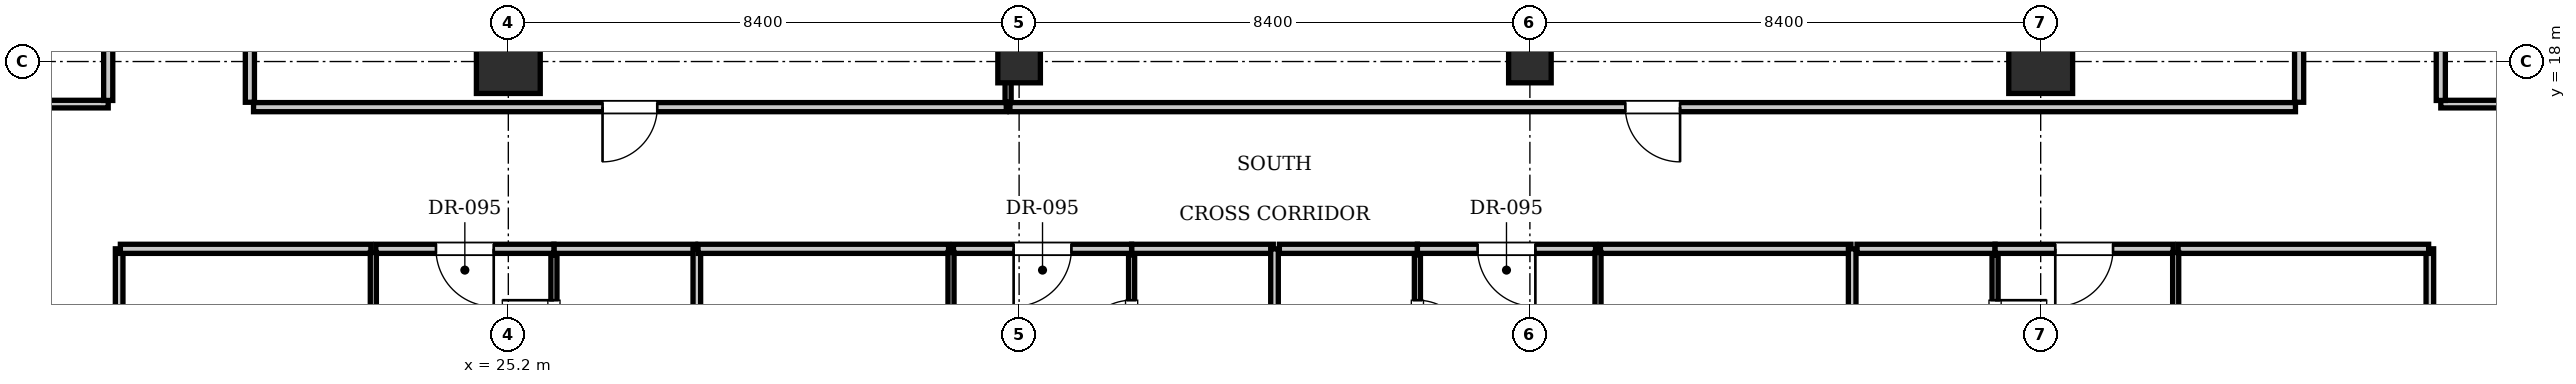
"""IFC4 building model, lengths in metres.
Left out: names, types, materials, properties, quantities, classifications, styles, units other than length and angle.
Written with IfcOpenShell. Run it as: python <this file> out.ifc"""

import sys

from ifc_helpers import new_model, si_unit, direction, frame, frame_2d, origin, origin_2d, place, context, subcontext, project, spatial, rectangle, i_section, extrude, element, fill, save


model = new_model("IFC4")
c1 = context("Model", 3, precision=1e-05, world=origin(), true_north=direction((0.0, 1.0)))
c2 = subcontext(c1, "Body", "Model", "MODEL_VIEW")
j1 = project(units=[si_unit("LENGTHUNIT", "METRE"), si_unit("PLANEANGLEUNIT", "RADIAN")], contexts=[c1])
p1 = place(None, origin())
s1 = spatial("IfcSite", under=j1, at=p1, CompositionType="ELEMENT")
p2 = place(p1, origin())
s2 = spatial("IfcBuilding", under=s1, at=p2, CompositionType="ELEMENT")
p3 = place(p2, frame((0.0, 0.0, 100.1)))
s3 = spatial("IfcBuildingStorey", under=s2, at=p3, CompositionType="ELEMENT", Elevation=100.1)
for number, where, z_axis, x_axis in (
    (1, (25.2, 18.0, 0.0), (0.0, 0.0, 1.0), (1.0, 0.0, 0.0)),
    (2, (50.4, 18.0, 0.0), (0.0, 0.0, 1.0), (1.0, 0.0, 0.0)),
):
    element("IfcColumn", number, at=place(p3, frame(where, z_axis=z_axis, x_axis=x_axis)), inside=s3, PredefinedType="COLUMN", context=c2, shape_type="SweptSolid", body=[
        extrude(rectangle(XDim=1.05, YDim=1.05, at=origin_2d()), origin(), (0.0, 0.0, 1.0), 3.85),
    ])
for number, where, z_axis, x_axis in (
    (3, (33.6, 18.0, 0.0), (0.0, 0.0, 1.0), (1.0, 0.0, 0.0)),
    (4, (42.0, 18.0, 0.0), (0.0, 0.0, 1.0), (1.0, 0.0, 0.0)),
):
    element("IfcColumn", number, at=place(p3, frame(where, z_axis=z_axis, x_axis=x_axis)), inside=s3, PredefinedType="COLUMN", context=c2, shape_type="SweptSolid", body=[
        extrude(i_section(OverallWidth=0.7, OverallDepth=0.7, WebThickness=0.028, FlangeThickness=0.044, at=origin_2d()), origin(), (0.0, 0.0, 1.0), 3.85),
    ])
for number, where, z_axis, x_axis in (
    (5, (20.95, 17.33, 0.0), (0.0, 0.0, 1.0), (0.0, 1.0, 0.0)),
    (6, (54.65, 17.33, 0.0), (0.0, 0.0, 1.0), (0.0, 1.0, 0.0)),
):
    element("IfcWall", number, at=place(p3, frame(where, z_axis=z_axis, x_axis=x_axis)), inside=s3, PredefinedType="PARTITIONING", context=c2, shape_type="SweptSolid", body=[
        extrude(rectangle(XDim=7.33, YDim=0.15, at=frame_2d((3.665, 0.0))), origin(), (0.0, 0.0, 1.0), 3.255),
    ])
p4 = place(p3, frame((21.01, 17.25, 0.0), z_axis=(0.0, 0.0, 1.0), x_axis=(1.0, 0.0, 0.0)))
e7 = element("IfcWall", 7, at=p4, inside=s3, PredefinedType="PARTITIONING", context=c2, shape_type="SweptSolid", body=[
    extrude(rectangle(XDim=12.379, YDim=0.15, at=frame_2d((6.189, 0.0))), origin(), (0.0, 0.0, 1.0), 3.61),
])
p5 = place(p4, frame((5.74, 0.0, 0.0)))
e8 = element("IfcOpeningElement", 8, at=p5, cuts=e7, PredefinedType="OPENING", context=c2, shape_type="SweptSolid", body=[
    extrude(rectangle(XDim=0.9, YDim=2.1, at=frame_2d((0.45, 1.05))), frame((0.0, 0.085, 0.0), z_axis=(0.0, -1.0, 0.0), x_axis=(1.0, 0.0, 0.0)), (0.0, 0.0, 1.0), 0.17),
])
p6 = place(p3, frame((33.419, 17.33, 0.0), z_axis=(0.0, 0.0, 1.0), x_axis=(0.0, 1.0, 0.0)))
e9 = element("IfcWall", 9, at=p6, inside=s3, PredefinedType="PARTITIONING", context=c2, shape_type="SweptSolid", body=[
    extrude(rectangle(XDim=7.33, YDim=0.1, at=frame_2d((3.665, 0.0))), origin(), (0.0, 0.0, 1.0), 2.999),
])
p7 = place(p3, frame((33.449, 17.25, 0.0), z_axis=(0.0, 0.0, 1.0), x_axis=(1.0, 0.0, 0.0)))
e10 = element("IfcWall", 10, at=p7, inside=s3, PredefinedType="PARTITIONING", context=c2, shape_type="SweptSolid", body=[
    extrude(rectangle(XDim=21.141, YDim=0.15, at=frame_2d((10.571, 0.0))), origin(), (0.0, 0.0, 1.0), 3.61),
])
p8 = place(p7, frame((10.121, 0.0, 0.0)))
e11 = element("IfcOpeningElement", 11, at=p8, cuts=e10, PredefinedType="OPENING", context=c2, shape_type="SweptSolid", body=[
    extrude(rectangle(XDim=0.9, YDim=2.1, at=frame_2d((0.45, 1.05))), frame((0.0, 0.085, 0.0), z_axis=(0.0, -1.0, 0.0), x_axis=(1.0, 0.0, 0.0)), (0.0, 0.0, 1.0), 0.17),
])
for number, where, z_axis, x_axis in (
    (12, (18.8, 0.1, 0.0), (0.0, 0.0, 1.0), (0.0, 1.0, 0.0)),
    (13, (56.8, 0.1, 0.0), (0.0, 0.0, 1.0), (0.0, 1.0, 0.0)),
):
    element("IfcWall", number, at=place(p3, frame(where, z_axis=z_axis, x_axis=x_axis)), inside=s3, PredefinedType="PARTITIONING", context=c2, shape_type="SweptSolid", body=[
        extrude(rectangle(XDim=14.82, YDim=0.125, at=frame_2d((7.41, 0.0))), origin(), (0.0, 0.0, 1.0), 3.61),
    ])
p9 = place(p3, frame((25.95, 14.92, 0.0), z_axis=(0.0, 0.0, 1.0), x_axis=(1.0, 0.0, 0.0)))
e14 = element("IfcWall", 14, at=p9, inside=s3, PredefinedType="PARTITIONING", context=c2, shape_type="SweptSolid", body=[
    extrude(rectangle(XDim=2.33, YDim=0.15, at=frame_2d((1.165, 0.0))), origin(), (0.0, 0.0, 1.0), 3.61),
])
p10 = place(p3, frame((25.95, 12.48, 0.0), z_axis=(0.0, 0.0, 1.0), x_axis=(0.0, 1.0, 0.0)))
e15 = element("IfcWall", 15, at=p10, inside=s3, PredefinedType="PARTITIONING", context=c2, shape_type="SweptSolid", body=[
    extrude(rectangle(XDim=2.34, YDim=0.1, at=frame_2d((1.17, 0.0))), origin(), (0.0, 0.0, 1.0), 3.61),
])
p11 = place(p10, frame((0.745, 0.0, 0.0)))
e16 = element("IfcOpeningElement", 16, at=p11, cuts=e15, PredefinedType="OPENING", context=c2, shape_type="SweptSolid", body=[
    extrude(rectangle(XDim=0.85, YDim=2.1, at=frame_2d((0.425, 1.05))), frame((0.0, 0.06, 0.0), z_axis=(0.0, -1.0, 0.0), x_axis=(1.0, 0.0, 0.0)), (0.0, 0.0, 1.0), 0.12),
])
p12 = place(p3, frame((18.82, 14.92, 0.0), z_axis=(0.0, 0.0, 1.0), x_axis=(1.0, 0.0, 0.0)))
e17 = element("IfcWall", 17, at=p12, inside=s3, PredefinedType="PARTITIONING", context=c2, shape_type="SweptSolid", body=[
    extrude(rectangle(XDim=4.12, YDim=0.15, at=frame_2d((2.06, 0.0))), origin(), (0.0, 0.0, 1.0), 3.61),
])
p13 = place(p3, frame((23.02, 14.92, 0.0), z_axis=(0.0, 0.0, 1.0), x_axis=(1.0, 0.0, 0.0)))
e18 = element("IfcWall", 18, at=p13, inside=s3, PredefinedType="PARTITIONING", context=c2, shape_type="SweptSolid", body=[
    extrude(rectangle(XDim=2.93, YDim=0.15, at=frame_2d((1.465, 0.0))), origin(), (0.0, 0.0, 1.0), 3.61),
])
p14 = place(p13, frame((0.99, 0.0, 0.0)))
e19 = element("IfcOpeningElement", 19, at=p14, cuts=e18, PredefinedType="OPENING", context=c2, shape_type="SweptSolid", body=[
    extrude(rectangle(XDim=0.95, YDim=2.15, at=frame_2d((0.475, 1.075))), frame((0.0, 0.085, 0.0), z_axis=(0.0, -1.0, 0.0), x_axis=(1.0, 0.0, 0.0)), (0.0, 0.0, 1.0), 0.17),
])
p15 = place(p3, frame((22.98, 0.03, 0.0), z_axis=(0.0, 0.0, 1.0), x_axis=(0.0, 1.0, 0.0)))
e20 = element("IfcWall", 20, at=p15, inside=s3, PredefinedType="PARTITIONING", context=c2, shape_type="SweptSolid", body=[
    extrude(rectangle(XDim=14.83, YDim=0.1, at=frame_2d((7.415, 0.0))), origin(), (0.0, 0.0, 1.0), 3.61),
])
p16 = place(p15, frame((1.6, 0.0, 0.0)))
e21 = element("IfcOpeningElement", 21, at=p16, cuts=e20, PredefinedType="OPENING", context=c2, shape_type="SweptSolid", body=[
    extrude(rectangle(XDim=0.9, YDim=2.1, at=frame_2d((0.45, 1.05))), frame((0.0, 0.06, 0.0), z_axis=(0.0, -1.0, 0.0), x_axis=(1.0, 0.0, 0.0)), (0.0, 0.0, 1.0), 0.12),
])
p17 = place(p3, frame((28.3, 0.1, 0.0), z_axis=(0.0, 0.0, 1.0), x_axis=(0.0, 1.0, 0.0)))
e22 = element("IfcWall", 22, at=p17, inside=s3, PredefinedType="PARTITIONING", context=c2, shape_type="SweptSolid", body=[
    extrude(rectangle(XDim=14.82, YDim=0.125, at=frame_2d((7.41, 0.0))), origin(), (0.0, 0.0, 1.0), 3.61),
])
p18 = place(p3, frame((35.45, 14.92, 0.0), z_axis=(0.0, 0.0, 1.0), x_axis=(1.0, 0.0, 0.0)))
e23 = element("IfcWall", 23, at=p18, inside=s3, PredefinedType="PARTITIONING", context=c2, shape_type="SweptSolid", body=[
    extrude(rectangle(XDim=2.33, YDim=0.15, at=frame_2d((1.165, 0.0))), origin(), (0.0, 0.0, 1.0), 3.61),
])
p19 = place(p3, frame((35.45, 12.48, 0.0), z_axis=(0.0, 0.0, 1.0), x_axis=(0.0, 1.0, 0.0)))
e24 = element("IfcWall", 24, at=p19, inside=s3, PredefinedType="PARTITIONING", context=c2, shape_type="SweptSolid", body=[
    extrude(rectangle(XDim=2.34, YDim=0.1, at=frame_2d((1.17, 0.0))), origin(), (0.0, 0.0, 1.0), 3.61),
])
p20 = place(p19, frame((0.745, 0.0, 0.0)))
e25 = element("IfcOpeningElement", 25, at=p20, cuts=e24, PredefinedType="OPENING", context=c2, shape_type="SweptSolid", body=[
    extrude(rectangle(XDim=0.85, YDim=2.1, at=frame_2d((0.425, 1.05))), frame((0.0, 0.06, 0.0), z_axis=(0.0, -1.0, 0.0), x_axis=(1.0, 0.0, 0.0)), (0.0, 0.0, 1.0), 0.12),
])
p21 = place(p3, frame((28.32, 14.92, 0.0), z_axis=(0.0, 0.0, 1.0), x_axis=(1.0, 0.0, 0.0)))
e26 = element("IfcWall", 26, at=p21, inside=s3, PredefinedType="PARTITIONING", context=c2, shape_type="SweptSolid", body=[
    extrude(rectangle(XDim=4.12, YDim=0.15, at=frame_2d((2.06, 0.0))), origin(), (0.0, 0.0, 1.0), 3.61),
])
p22 = place(p3, frame((32.52, 14.92, 0.0), z_axis=(0.0, 0.0, 1.0), x_axis=(1.0, 0.0, 0.0)))
e27 = element("IfcWall", 27, at=p22, inside=s3, PredefinedType="PARTITIONING", context=c2, shape_type="SweptSolid", body=[
    extrude(rectangle(XDim=2.93, YDim=0.15, at=frame_2d((1.465, 0.0))), origin(), (0.0, 0.0, 1.0), 3.61),
])
p23 = place(p22, frame((0.99, 0.0, 0.0)))
e28 = element("IfcOpeningElement", 28, at=p23, cuts=e27, PredefinedType="OPENING", context=c2, shape_type="SweptSolid", body=[
    extrude(rectangle(XDim=0.95, YDim=2.15, at=frame_2d((0.475, 1.075))), frame((0.0, 0.085, 0.0), z_axis=(0.0, -1.0, 0.0), x_axis=(1.0, 0.0, 0.0)), (0.0, 0.0, 1.0), 0.17),
])
p24 = place(p3, frame((32.48, 0.03, 0.0), z_axis=(0.0, 0.0, 1.0), x_axis=(0.0, 1.0, 0.0)))
e29 = element("IfcWall", 29, at=p24, inside=s3, PredefinedType="PARTITIONING", context=c2, shape_type="SweptSolid", body=[
    extrude(rectangle(XDim=14.83, YDim=0.1, at=frame_2d((7.415, 0.0))), origin(), (0.0, 0.0, 1.0), 3.61),
])
p25 = place(p24, frame((1.6, 0.0, 0.0)))
e30 = element("IfcOpeningElement", 30, at=p25, cuts=e29, PredefinedType="OPENING", context=c2, shape_type="SweptSolid", body=[
    extrude(rectangle(XDim=0.9, YDim=2.1, at=frame_2d((0.45, 1.05))), frame((0.0, 0.06, 0.0), z_axis=(0.0, -1.0, 0.0), x_axis=(1.0, 0.0, 0.0)), (0.0, 0.0, 1.0), 0.12),
])
p26 = place(p3, frame((37.8, 0.1, 0.0), z_axis=(0.0, 0.0, 1.0), x_axis=(0.0, 1.0, 0.0)))
e31 = element("IfcWall", 31, at=p26, inside=s3, PredefinedType="PARTITIONING", context=c2, shape_type="SweptSolid", body=[
    extrude(rectangle(XDim=14.82, YDim=0.125, at=frame_2d((7.41, 0.0))), origin(), (0.0, 0.0, 1.0), 3.352),
])
p27 = place(p3, frame((37.88, 14.92, 0.0), z_axis=(0.0, 0.0, 1.0), x_axis=(1.0, 0.0, 0.0)))
e32 = element("IfcWall", 32, at=p27, inside=s3, PredefinedType="PARTITIONING", context=c2, shape_type="SweptSolid", body=[
    extrude(rectangle(XDim=2.27, YDim=0.15, at=frame_2d((1.135, 0.0))), origin(), (0.0, 0.0, 1.0), 3.61),
])
p28 = place(p3, frame((40.15, 12.48, 0.0), z_axis=(0.0, 0.0, 1.0), x_axis=(0.0, 1.0, 0.0)))
e33 = element("IfcWall", 33, at=p28, inside=s3, PredefinedType="PARTITIONING", context=c2, shape_type="SweptSolid", body=[
    extrude(rectangle(XDim=2.34, YDim=0.1, at=frame_2d((1.17, 0.0))), origin(), (0.0, 0.0, 1.0), 3.61),
])
p29 = place(p28, frame((0.745, 0.0, 0.0)))
e34 = element("IfcOpeningElement", 34, at=p29, cuts=e33, PredefinedType="OPENING", context=c2, shape_type="SweptSolid", body=[
    extrude(rectangle(XDim=0.85, YDim=2.1, at=frame_2d((0.425, 1.05))), frame((0.0, 0.06, 0.0), z_axis=(0.0, -1.0, 0.0), x_axis=(1.0, 0.0, 0.0)), (0.0, 0.0, 1.0), 0.12),
])
p30 = place(p3, frame((40.15, 14.92, 0.0), z_axis=(0.0, 0.0, 1.0), x_axis=(1.0, 0.0, 0.0)))
e35 = element("IfcWall", 35, at=p30, inside=s3, PredefinedType="PARTITIONING", context=c2, shape_type="SweptSolid", body=[
    extrude(rectangle(XDim=2.93, YDim=0.15, at=frame_2d((1.465, 0.0))), origin(), (0.0, 0.0, 1.0), 3.61),
])
p31 = place(p30, frame((0.99, 0.0, 0.0)))
e36 = element("IfcOpeningElement", 36, at=p31, cuts=e35, PredefinedType="OPENING", context=c2, shape_type="SweptSolid", body=[
    extrude(rectangle(XDim=0.95, YDim=2.15, at=frame_2d((0.475, 1.075))), frame((0.0, 0.085, 0.0), z_axis=(0.0, -1.0, 0.0), x_axis=(1.0, 0.0, 0.0)), (0.0, 0.0, 1.0), 0.17),
])
p32 = place(p3, frame((43.16, 14.92, 0.0), z_axis=(0.0, 0.0, 1.0), x_axis=(1.0, 0.0, 0.0)))
e37 = element("IfcWall", 37, at=p32, inside=s3, PredefinedType="PARTITIONING", context=c2, shape_type="SweptSolid", body=[
    extrude(rectangle(XDim=4.12, YDim=0.15, at=frame_2d((2.06, 0.0))), origin(), (0.0, 0.0, 1.0), 3.61),
])
p33 = place(p3, frame((43.12, 0.03, 0.0), z_axis=(0.0, 0.0, 1.0), x_axis=(0.0, 1.0, 0.0)))
e38 = element("IfcWall", 38, at=p33, inside=s3, PredefinedType="PARTITIONING", context=c2, shape_type="SweptSolid", body=[
    extrude(rectangle(XDim=14.83, YDim=0.1, at=frame_2d((7.415, 0.0))), origin(), (0.0, 0.0, 1.0), 3.61),
])
p34 = place(p33, frame((1.6, 0.0, 0.0)))
e39 = element("IfcOpeningElement", 39, at=p34, cuts=e38, PredefinedType="OPENING", context=c2, shape_type="SweptSolid", body=[
    extrude(rectangle(XDim=0.9, YDim=2.1, at=frame_2d((0.45, 1.05))), frame((0.0, 0.06, 0.0), z_axis=(0.0, -1.0, 0.0), x_axis=(1.0, 0.0, 0.0)), (0.0, 0.0, 1.0), 0.12),
])
p35 = place(p3, frame((47.3, 0.1, 0.0), z_axis=(0.0, 0.0, 1.0), x_axis=(0.0, 1.0, 0.0)))
e40 = element("IfcWall", 40, at=p35, inside=s3, PredefinedType="PARTITIONING", context=c2, shape_type="SweptSolid", body=[
    extrude(rectangle(XDim=14.82, YDim=0.125, at=frame_2d((7.41, 0.0))), origin(), (0.0, 0.0, 1.0), 3.61),
])
p36 = place(p3, frame((47.38, 14.92, 0.0), z_axis=(0.0, 0.0, 1.0), x_axis=(1.0, 0.0, 0.0)))
e41 = element("IfcWall", 41, at=p36, inside=s3, PredefinedType="PARTITIONING", context=c2, shape_type="SweptSolid", body=[
    extrude(rectangle(XDim=2.27, YDim=0.15, at=frame_2d((1.135, 0.0))), origin(), (0.0, 0.0, 1.0), 3.61),
])
p37 = place(p3, frame((49.65, 12.48, 0.0), z_axis=(0.0, 0.0, 1.0), x_axis=(0.0, 1.0, 0.0)))
e42 = element("IfcWall", 42, at=p37, inside=s3, PredefinedType="PARTITIONING", context=c2, shape_type="SweptSolid", body=[
    extrude(rectangle(XDim=2.34, YDim=0.1, at=frame_2d((1.17, 0.0))), origin(), (0.0, 0.0, 1.0), 3.61),
])
p38 = place(p37, frame((0.745, 0.0, 0.0)))
e43 = element("IfcOpeningElement", 43, at=p38, cuts=e42, PredefinedType="OPENING", context=c2, shape_type="SweptSolid", body=[
    extrude(rectangle(XDim=0.85, YDim=2.1, at=frame_2d((0.425, 1.05))), frame((0.0, 0.06, 0.0), z_axis=(0.0, -1.0, 0.0), x_axis=(1.0, 0.0, 0.0)), (0.0, 0.0, 1.0), 0.12),
])
p39 = place(p3, frame((49.65, 14.92, 0.0), z_axis=(0.0, 0.0, 1.0), x_axis=(1.0, 0.0, 0.0)))
e44 = element("IfcWall", 44, at=p39, inside=s3, PredefinedType="PARTITIONING", context=c2, shape_type="SweptSolid", body=[
    extrude(rectangle(XDim=2.93, YDim=0.15, at=frame_2d((1.465, 0.0))), origin(), (0.0, 0.0, 1.0), 3.61),
])
p40 = place(p39, frame((0.99, 0.0, 0.0)))
e45 = element("IfcOpeningElement", 45, at=p40, cuts=e44, PredefinedType="OPENING", context=c2, shape_type="SweptSolid", body=[
    extrude(rectangle(XDim=0.95, YDim=2.15, at=frame_2d((0.475, 1.075))), frame((0.0, 0.085, 0.0), z_axis=(0.0, -1.0, 0.0), x_axis=(1.0, 0.0, 0.0)), (0.0, 0.0, 1.0), 0.17),
])
p41 = place(p3, frame((52.66, 14.92, 0.0), z_axis=(0.0, 0.0, 1.0), x_axis=(1.0, 0.0, 0.0)))
e46 = element("IfcWall", 46, at=p41, inside=s3, PredefinedType="PARTITIONING", context=c2, shape_type="SweptSolid", body=[
    extrude(rectangle(XDim=4.12, YDim=0.15, at=frame_2d((2.06, 0.0))), origin(), (0.0, 0.0, 1.0), 3.61),
])
p42 = place(p3, frame((52.62, 0.03, 0.0), z_axis=(0.0, 0.0, 1.0), x_axis=(0.0, 1.0, 0.0)))
e47 = element("IfcWall", 47, at=p42, inside=s3, PredefinedType="PARTITIONING", context=c2, shape_type="SweptSolid", body=[
    extrude(rectangle(XDim=14.83, YDim=0.1, at=frame_2d((7.415, 0.0))), origin(), (0.0, 0.0, 1.0), 3.61),
])
p43 = place(p42, frame((1.6, 0.0, 0.0)))
e48 = element("IfcOpeningElement", 48, at=p43, cuts=e47, PredefinedType="OPENING", context=c2, shape_type="SweptSolid", body=[
    extrude(rectangle(XDim=0.9, YDim=2.1, at=frame_2d((0.45, 1.05))), frame((0.0, 0.06, 0.0), z_axis=(0.0, -1.0, 0.0), x_axis=(1.0, 0.0, 0.0)), (0.0, 0.0, 1.0), 0.12),
])
p44 = place(p3, frame((10.9, 17.3, 0.0), z_axis=(0.0, 0.0, 1.0), x_axis=(1.0, 0.0, 0.0)))
e49 = element("IfcWall", 49, at=p44, inside=s3, PredefinedType="PARTITIONING", context=c2, shape_type="SweptSolid", body=[
    extrude(rectangle(XDim=7.72, YDim=0.125, at=frame_2d((3.86, 0.0))), origin(), (0.0, 0.0, 1.0), 3.61),
])
p45 = place(p3, frame((56.98, 17.3, 0.0), z_axis=(0.0, 0.0, 1.0), x_axis=(1.0, 0.0, 0.0)))
e50 = element("IfcWall", 50, at=p45, inside=s3, PredefinedType="PARTITIONING", context=c2, shape_type="SweptSolid", body=[
    extrude(rectangle(XDim=7.72, YDim=0.125, at=frame_2d((3.86, 0.0))), origin(), (0.0, 0.0, 1.0), 3.61),
])
for number, where, z_axis, x_axis in (
    (51, (18.62, 17.36, 0.0), (0.0, 0.0, 1.0), (0.0, 1.0, 0.0)),
    (52, (56.98, 17.36, 0.0), (0.0, 0.0, 1.0), (0.0, 1.0, 0.0)),
):
    element("IfcWall", number, at=place(p3, frame(where, z_axis=z_axis, x_axis=x_axis)), inside=s3, PredefinedType="PARTITIONING", context=c2, shape_type="SweptSolid", body=[
        extrude(rectangle(XDim=1.89, YDim=0.15, at=frame_2d((0.945, 0.0))), origin(), (0.0, 0.0, 1.0), 3.61),
    ])
p46 = place(p5, frame((0.9, 0.0, 0.0), z_axis=(0.0, 0.0, 1.0), x_axis=(-1.0, 0.0, 0.0)))
e53 = element("IfcDoor", 53, at=p46, inside=s3, OperationType="SINGLE_SWING_RIGHT", PredefinedType="DOOR", context=c2, shape_type="SweptSolid", body=[
    extrude(rectangle(XDim=0.9, YDim=2.1, at=frame_2d((0.45, 1.05))), frame((0.0, 0.025, 0.0), z_axis=(0.0, -1.0, 0.0), x_axis=(1.0, 0.0, 0.0)), (0.0, 0.0, 1.0), 0.05),
])
fill(e8, e53)
p47 = place(p8, frame((0.9, 0.0, 0.0), z_axis=(0.0, 0.0, 1.0), x_axis=(-1.0, 0.0, 0.0)))
e54 = element("IfcDoor", 54, at=p47, inside=s3, OperationType="SINGLE_SWING_LEFT", PredefinedType="DOOR", context=c2, shape_type="SweptSolid", body=[
    extrude(rectangle(XDim=0.9, YDim=2.1, at=frame_2d((0.45, 1.05))), frame((0.0, 0.025, 0.0), z_axis=(0.0, -1.0, 0.0), x_axis=(1.0, 0.0, 0.0)), (0.0, 0.0, 1.0), 0.05),
])
fill(e11, e54)
p48 = place(p11, origin())
e55 = element("IfcDoor", 55, at=p48, inside=s3, OperationType="SINGLE_SWING_RIGHT", PredefinedType="DOOR", context=c2, shape_type="SweptSolid", body=[
    extrude(rectangle(XDim=0.85, YDim=2.1, at=frame_2d((0.425, 1.05))), frame((0.0, 0.025, 0.0), z_axis=(0.0, -1.0, 0.0), x_axis=(1.0, 0.0, 0.0)), (0.0, 0.0, 1.0), 0.05),
])
fill(e16, e55)
p49 = place(p14, frame((0.95, 0.0, 0.0), z_axis=(0.0, 0.0, 1.0), x_axis=(-1.0, 0.0, 0.0)))
e56 = element("IfcDoor", 56, at=p49, inside=s3, OperationType="SINGLE_SWING_LEFT", PredefinedType="DOOR", context=c2, shape_type="SweptSolid", body=[
    extrude(rectangle(XDim=0.95, YDim=2.15, at=frame_2d((0.475, 1.075))), frame((0.0, 0.025, 0.0), z_axis=(0.0, -1.0, 0.0), x_axis=(1.0, 0.0, 0.0)), (0.0, 0.0, 1.0), 0.05),
])
fill(e19, e56)
p50 = place(p20, origin())
e57 = element("IfcDoor", 57, at=p50, inside=s3, OperationType="SINGLE_SWING_LEFT", PredefinedType="DOOR", context=c2, shape_type="SweptSolid", body=[
    extrude(rectangle(XDim=0.85, YDim=2.1, at=frame_2d((0.425, 1.05))), frame((0.0, 0.025, 0.0), z_axis=(0.0, -1.0, 0.0), x_axis=(1.0, 0.0, 0.0)), (0.0, 0.0, 1.0), 0.05),
])
fill(e25, e57)
p51 = place(p23, frame((0.95, 0.0, 0.0), z_axis=(0.0, 0.0, 1.0), x_axis=(-1.0, 0.0, 0.0)))
e58 = element("IfcDoor", 58, at=p51, inside=s3, OperationType="SINGLE_SWING_RIGHT", PredefinedType="DOOR", context=c2, shape_type="SweptSolid", body=[
    extrude(rectangle(XDim=0.95, YDim=2.15, at=frame_2d((0.475, 1.075))), frame((0.0, 0.025, 0.0), z_axis=(0.0, -1.0, 0.0), x_axis=(1.0, 0.0, 0.0)), (0.0, 0.0, 1.0), 0.05),
])
fill(e28, e58)
p52 = place(p29, frame((0.85, 0.0, 0.0), z_axis=(0.0, 0.0, 1.0), x_axis=(-1.0, 0.0, 0.0)))
e59 = element("IfcDoor", 59, at=p52, inside=s3, OperationType="SINGLE_SWING_RIGHT", PredefinedType="DOOR", context=c2, shape_type="SweptSolid", body=[
    extrude(rectangle(XDim=0.85, YDim=2.1, at=frame_2d((0.425, 1.05))), frame((0.0, 0.025, 0.0), z_axis=(0.0, -1.0, 0.0), x_axis=(1.0, 0.0, 0.0)), (0.0, 0.0, 1.0), 0.05),
])
fill(e34, e59)
p53 = place(p31, frame((0.95, 0.0, 0.0), z_axis=(0.0, 0.0, 1.0), x_axis=(-1.0, 0.0, 0.0)))
e60 = element("IfcDoor", 60, at=p53, inside=s3, OperationType="SINGLE_SWING_LEFT", PredefinedType="DOOR", context=c2, shape_type="SweptSolid", body=[
    extrude(rectangle(XDim=0.95, YDim=2.15, at=frame_2d((0.475, 1.075))), frame((0.0, 0.025, 0.0), z_axis=(0.0, -1.0, 0.0), x_axis=(1.0, 0.0, 0.0)), (0.0, 0.0, 1.0), 0.05),
])
fill(e36, e60)
p54 = place(p38, frame((0.85, 0.0, 0.0), z_axis=(0.0, 0.0, 1.0), x_axis=(-1.0, 0.0, 0.0)))
e61 = element("IfcDoor", 61, at=p54, inside=s3, OperationType="SINGLE_SWING_LEFT", PredefinedType="DOOR", context=c2, shape_type="SweptSolid", body=[
    extrude(rectangle(XDim=0.85, YDim=2.1, at=frame_2d((0.425, 1.05))), frame((0.0, 0.025, 0.0), z_axis=(0.0, -1.0, 0.0), x_axis=(1.0, 0.0, 0.0)), (0.0, 0.0, 1.0), 0.05),
])
fill(e43, e61)
p55 = place(p40, frame((0.95, 0.0, 0.0), z_axis=(0.0, 0.0, 1.0), x_axis=(-1.0, 0.0, 0.0)))
e62 = element("IfcDoor", 62, at=p55, inside=s3, OperationType="SINGLE_SWING_RIGHT", PredefinedType="DOOR", context=c2, shape_type="SweptSolid", body=[
    extrude(rectangle(XDim=0.95, YDim=2.15, at=frame_2d((0.475, 1.075))), frame((0.0, 0.025, 0.0), z_axis=(0.0, -1.0, 0.0), x_axis=(1.0, 0.0, 0.0)), (0.0, 0.0, 1.0), 0.05),
])
fill(e45, e62)
save(model, sys.argv[1])
